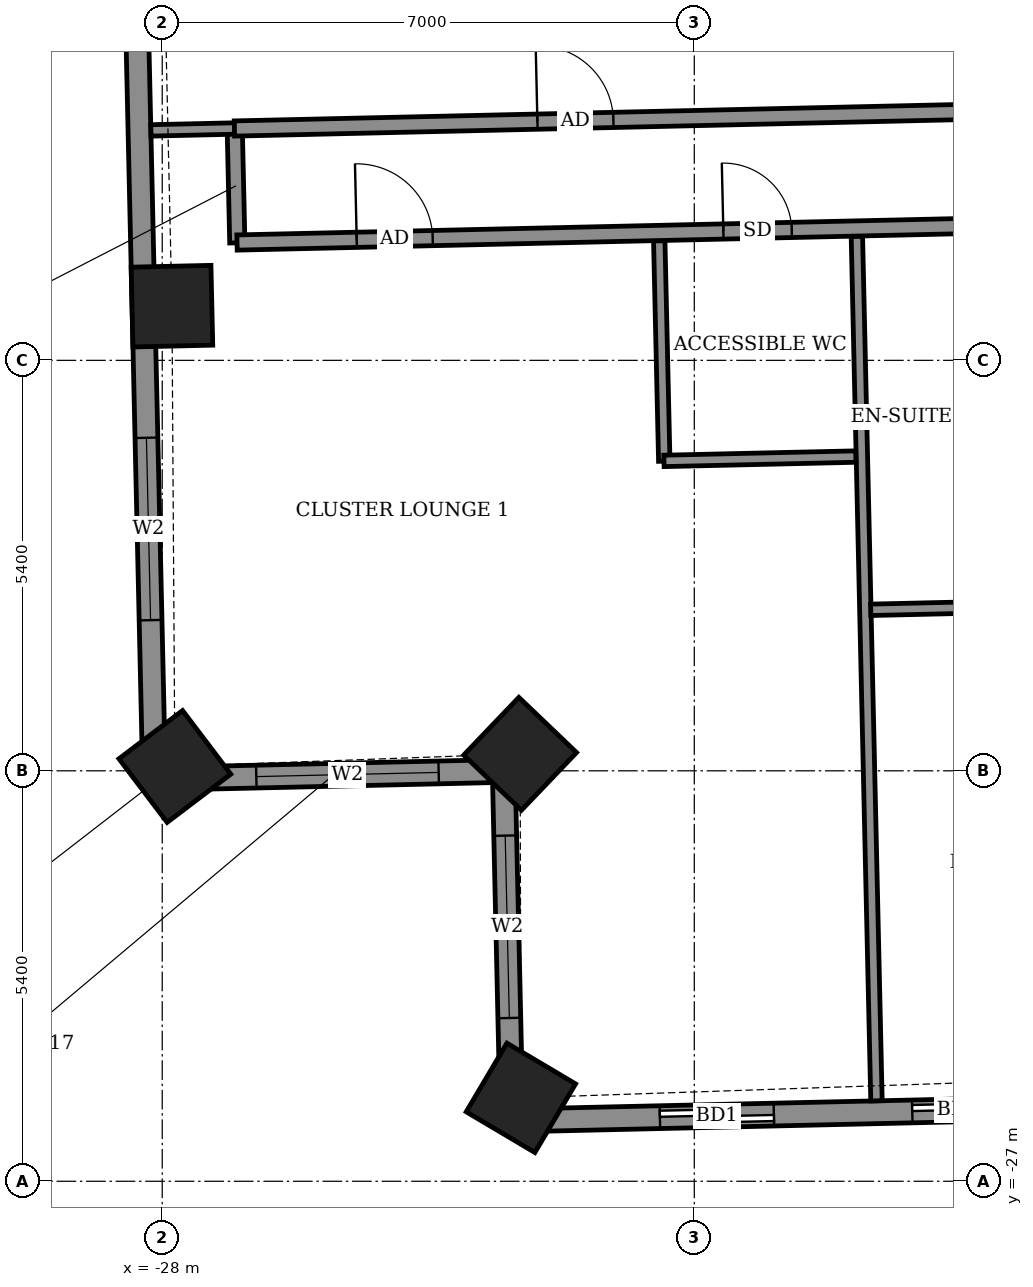
"""IFC4 building model, lengths in metres.
Left out: names, types, materials, properties, quantities, classifications, styles, units other than length and angle.
Written with IfcOpenShell. Run it as: python <this file> out.ifc"""

import sys

from ifc_helpers import new_model, si_unit, direction, frame, frame_2d, origin, origin_2d, place, context, subcontext, project, spatial, rectangle, extrude, element, fill, save


model = new_model("IFC4")
c1 = context("Model", 3, precision=1e-05, world=origin(), true_north=direction((0.0, 1.0)))
c2 = subcontext(c1, "Body", "Model", "MODEL_VIEW")
j1 = project(units=[si_unit("LENGTHUNIT", "METRE"), si_unit("PLANEANGLEUNIT", "RADIAN")], contexts=[c1])
p1 = place(None, origin())
s1 = spatial("IfcSite", under=j1, at=p1, CompositionType="ELEMENT")
p2 = place(p1, origin())
s2 = spatial("IfcBuilding", under=s1, at=p2, CompositionType="ELEMENT")
p3 = place(p2, frame((0.0, 0.0, 249.1)))
s3 = spatial("IfcBuildingStorey", under=s2, at=p3, CompositionType="ELEMENT", Elevation=249.1)
for number, where, z_axis, x_axis in (
    (1, (-27.872, -15.487, -0.55), (0.0, 0.0, 1.0), (0.023, -1.0, 0.0)),
    (2, (-27.833, -21.543, -0.55), (0.0, 0.0, 1.0), (0.604, -0.797, 0.0)),
    (3, (-23.291, -21.376, -0.55), (0.0, 0.0, 1.0), (0.723, -0.691, 0.0)),
    (4, (-23.281, -25.902, -0.55), (0.0, 0.0, 1.0), (0.86, -0.51, 0.0)),
):
    element("IfcColumn", number, at=place(p3, frame(where, z_axis=z_axis, x_axis=x_axis)), inside=s3, PredefinedType="COLUMN", context=c2, shape_type="SweptSolid", body=[
        extrude(rectangle(XDim=1.05, YDim=1.05, at=origin_2d()), origin(), (0.0, 0.0, 1.0), 3.6),
    ])
p4 = place(p3, frame((-28.403, -8.61, 0.0), z_axis=(0.0, 0.0, 1.0), x_axis=(0.022680342038, -0.999742767958, 0.0)))
e5 = element("IfcWall", 5, at=p4, inside=s3, PredefinedType="SOLIDWALL", context=c2, shape_type="SweptSolid", body=[
    extrude(rectangle(XDim=13.1, YDim=0.3, at=frame_2d((6.55, 0.0))), origin(), (0.0, 0.0, 1.0), 2.55),
])
p5 = place(p4, frame((1.937, 0.0, 0.0)))
e6 = element("IfcOpeningElement", 6, at=p5, cuts=e5, PredefinedType="OPENING", context=c2, shape_type="SweptSolid", body=[
    extrude(rectangle(XDim=1.5, YDim=2.4, at=frame_2d((0.75, 1.2))), frame((0.0, 0.16, 0.0), z_axis=(0.0, -1.0, 0.0), x_axis=(1.0, 0.0, 0.0)), (0.0, 0.0, 1.0), 0.32),
])
p6 = place(p4, frame((8.611, 0.0, 0.9)))
e7 = element("IfcOpeningElement", 7, at=p6, cuts=e5, PredefinedType="OPENING", context=c2, shape_type="SweptSolid", body=[
    extrude(rectangle(XDim=2.4, YDim=1.5, at=frame_2d((1.2, 0.75))), frame((0.0, 0.16, 0.0), z_axis=(0.0, -1.0, 0.0), x_axis=(1.0, 0.0, 0.0)), (0.0, 0.0, 1.0), 0.32),
])
p7 = place(p3, frame((-28.106, -21.707, 0.0), z_axis=(0.0, 0.0, 1.0), x_axis=(0.999738756298, 0.022856490471, 0.0)))
e8 = element("IfcWall", 8, at=p7, inside=s3, PredefinedType="SOLIDWALL", context=c2, shape_type="SweptSolid", body=[
    extrude(rectangle(XDim=4.721, YDim=0.3, at=frame_2d((2.361, 0.0))), origin(), (0.0, 0.0, 1.0), 2.55),
])
p8 = place(p7, frame((1.344, 0.0, 0.9)))
e9 = element("IfcOpeningElement", 9, at=p8, cuts=e8, PredefinedType="OPENING", context=c2, shape_type="SweptSolid", body=[
    extrude(rectangle(XDim=2.4, YDim=1.5, at=frame_2d((1.2, 0.75))), frame((0.0, 0.16, 0.0), z_axis=(0.0, -1.0, 0.0), x_axis=(1.0, 0.0, 0.0)), (0.0, 0.0, 1.0), 0.32),
])
p9 = place(p3, frame((-23.507, -21.602, 0.0), z_axis=(0.0, 0.0, 1.0), x_axis=(0.022609285172, -0.999744377441, 0.0)))
e10 = element("IfcWall", 10, at=p9, inside=s3, PredefinedType="SOLIDWALL", context=c2, shape_type="SweptSolid", body=[
    extrude(rectangle(XDim=4.6, YDim=0.3, at=frame_2d((2.3, 0.0))), origin(), (0.0, 0.0, 1.0), 2.55),
])
p10 = place(p9, frame((0.851, 0.0, 0.9)))
e11 = element("IfcOpeningElement", 11, at=p10, cuts=e10, PredefinedType="OPENING", context=c2, shape_type="SweptSolid", body=[
    extrude(rectangle(XDim=2.4, YDim=1.5, at=frame_2d((1.2, 0.75))), frame((0.0, 0.16, 0.0), z_axis=(0.0, -1.0, 0.0), x_axis=(1.0, 0.0, 0.0)), (0.0, 0.0, 1.0), 0.32),
])
p11 = place(p3, frame((-23.403, -26.201, 0.0), z_axis=(0.0, 0.0, 1.0), x_axis=(0.999742770494, 0.022680230258, 0.0)))
e12 = element("IfcWall", 12, at=p11, inside=s3, PredefinedType="SOLIDWALL", context=c2, shape_type="SweptSolid", body=[
    extrude(rectangle(XDim=43.908, YDim=0.3, at=frame_2d((21.954, 0.0))), origin(), (0.0, 0.0, 1.0), 2.55),
])
p12 = place(p11, frame((1.951, 0.0, 0.0)))
e13 = element("IfcOpeningElement", 13, at=p12, cuts=e12, PredefinedType="OPENING", context=c2, shape_type="SweptSolid", body=[
    extrude(rectangle(XDim=1.5, YDim=2.4, at=frame_2d((0.75, 1.2))), frame((0.0, 0.16, 0.0), z_axis=(0.0, -1.0, 0.0), x_axis=(1.0, 0.0, 0.0)), (0.0, 0.0, 1.0), 0.32),
])
p13 = place(p11, frame((5.272, 0.0, 0.0)))
e14 = element("IfcOpeningElement", 14, at=p13, cuts=e12, PredefinedType="OPENING", context=c2, shape_type="SweptSolid", body=[
    extrude(rectangle(XDim=1.2, YDim=2.4, at=frame_2d((0.6, 1.2))), frame((0.0, 0.16, 0.0), z_axis=(0.0, -1.0, 0.0), x_axis=(1.0, 0.0, 0.0)), (0.0, 0.0, 1.0), 0.32),
])
p14 = place(p11, frame((10.475, 0.0, 0.0)))
e15 = element("IfcOpeningElement", 15, at=p14, cuts=e12, PredefinedType="OPENING", context=c2, shape_type="SweptSolid", body=[
    extrude(rectangle(XDim=1.5, YDim=2.4, at=frame_2d((0.75, 1.2))), frame((0.0, 0.16, 0.0), z_axis=(0.0, -1.0, 0.0), x_axis=(1.0, 0.0, 0.0)), (0.0, 0.0, 1.0), 0.32),
])
p15 = place(p11, frame((15.53, 0.0, 0.0)))
e16 = element("IfcOpeningElement", 16, at=p15, cuts=e12, PredefinedType="OPENING", context=c2, shape_type="SweptSolid", body=[
    extrude(rectangle(XDim=1.5, YDim=2.4, at=frame_2d((0.75, 1.2))), frame((0.0, 0.16, 0.0), z_axis=(0.0, -1.0, 0.0), x_axis=(1.0, 0.0, 0.0)), (0.0, 0.0, 1.0), 0.32),
])
p16 = place(p11, frame((18.939, 0.0, 0.0)))
e17 = element("IfcOpeningElement", 17, at=p16, cuts=e12, PredefinedType="OPENING", context=c2, shape_type="SweptSolid", body=[
    extrude(rectangle(XDim=1.5, YDim=2.4, at=frame_2d((0.75, 1.2))), frame((0.0, 0.16, 0.0), z_axis=(0.0, -1.0, 0.0), x_axis=(1.0, 0.0, 0.0)), (0.0, 0.0, 1.0), 0.32),
])
p17 = place(p11, frame((23.489, 0.0, 0.0)))
e18 = element("IfcOpeningElement", 18, at=p17, cuts=e12, PredefinedType="OPENING", context=c2, shape_type="SweptSolid", body=[
    extrude(rectangle(XDim=1.5, YDim=2.4, at=frame_2d((0.75, 1.2))), frame((0.0, 0.16, 0.0), z_axis=(0.0, -1.0, 0.0), x_axis=(1.0, 0.0, 0.0)), (0.0, 0.0, 1.0), 0.32),
])
p18 = place(p11, frame((26.898, 0.0, 0.0)))
e19 = element("IfcOpeningElement", 19, at=p18, cuts=e12, PredefinedType="OPENING", context=c2, shape_type="SweptSolid", body=[
    extrude(rectangle(XDim=1.5, YDim=2.4, at=frame_2d((0.75, 1.2))), frame((0.0, 0.16, 0.0), z_axis=(0.0, -1.0, 0.0), x_axis=(1.0, 0.0, 0.0)), (0.0, 0.0, 1.0), 0.32),
])
p19 = place(p11, frame((32.05, 0.0, 0.0)))
e20 = element("IfcOpeningElement", 20, at=p19, cuts=e12, PredefinedType="OPENING", context=c2, shape_type="SweptSolid", body=[
    extrude(rectangle(XDim=1.5, YDim=2.4, at=frame_2d((0.75, 1.2))), frame((0.0, 0.16, 0.0), z_axis=(0.0, -1.0, 0.0), x_axis=(1.0, 0.0, 0.0)), (0.0, 0.0, 1.0), 0.32),
])
p20 = place(p11, frame((37.382, 0.0, 0.0)))
e21 = element("IfcOpeningElement", 21, at=p20, cuts=e12, PredefinedType="OPENING", context=c2, shape_type="SweptSolid", body=[
    extrude(rectangle(XDim=1.5, YDim=2.4, at=frame_2d((0.75, 1.2))), frame((0.0, 0.16, 0.0), z_axis=(0.0, -1.0, 0.0), x_axis=(1.0, 0.0, 0.0)), (0.0, 0.0, 1.0), 0.32),
])
p21 = place(p11, frame((40.057, 0.0, 0.9)))
e22 = element("IfcOpeningElement", 22, at=p21, cuts=e12, PredefinedType="OPENING", context=c2, shape_type="SweptSolid", body=[
    extrude(rectangle(XDim=2.4, YDim=1.5, at=frame_2d((1.2, 0.75))), frame((0.0, 0.16, 0.0), z_axis=(0.0, -1.0, 0.0), x_axis=(1.0, 0.0, 0.0)), (0.0, 0.0, 1.0), 0.32),
])
p22 = place(p3, frame((-18.603, -25.942, 0.0), z_axis=(0.0, 0.0, 1.0), x_axis=(-0.022684842063, 0.99974266586, 0.0)))
e23 = element("IfcWall", 23, at=p22, inside=s3, PredefinedType="PARTITIONING", context=c2, shape_type="SweptSolid", body=[
    extrude(rectangle(XDim=11.376, YDim=0.15, at=frame_2d((5.688, 0.0))), origin(), (0.0, 0.0, 1.0), 2.55),
])
p23 = place(p3, frame((-18.679, -19.482, 0.0), z_axis=(0.0, 0.0, 1.0), x_axis=(0.999740478815, 0.022781023197, 0.0)))
e24 = element("IfcWall", 24, at=p23, inside=s3, PredefinedType="PARTITIONING", context=c2, shape_type="SweptSolid", body=[
    extrude(rectangle(XDim=2.325, YDim=0.15, at=frame_2d((1.163, 0.0))), origin(), (0.0, 0.0, 1.0), 3.05),
])
p24 = place(p3, frame((-21.395, -17.527, 0.0), z_axis=(0.0, 0.0, 1.0), x_axis=(-0.022730967319, 0.999741618182, 0.0)))
e25 = element("IfcWall", 25, at=p24, inside=s3, PredefinedType="PARTITIONING", context=c2, shape_type="SweptSolid", body=[
    extrude(rectangle(XDim=2.9, YDim=0.15, at=frame_2d((1.45, 0.0))), origin(), (0.0, 0.0, 1.0), 3.05),
])
p25 = place(p3, frame((-21.399, -17.523, 0.0), z_axis=(0.0, 0.0, 1.0), x_axis=(0.9997461113, 0.022532486354, 0.0)))
e26 = element("IfcWall", 26, at=p25, inside=s3, PredefinedType="PARTITIONING", context=c2, shape_type="SweptSolid", body=[
    extrude(rectangle(XDim=2.525, YDim=0.15, at=frame_2d((1.262, 0.0))), origin(), (0.0, 0.0, 1.0), 3.05),
])
p26 = place(p3, frame((-27.012, -14.654, 0.0), z_axis=(0.0, 0.0, 1.0), x_axis=(-0.022617910375, 0.999744182344, 0.0)))
e27 = element("IfcWall", 27, at=p26, inside=s3, PredefinedType="PARTITIONING", context=c2, shape_type="SweptSolid", body=[
    extrude(rectangle(XDim=1.5, YDim=0.2, at=frame_2d((0.75, 0.0))), origin(), (0.0, 0.0, 1.0), 3.05),
])
p27 = place(p3, frame((-27.016, -14.65, 0.0), z_axis=(0.0, 0.0, 1.0), x_axis=(0.999742874861, 0.022675629315, 0.0)))
e28 = element("IfcWall", 28, at=p27, inside=s3, PredefinedType="PARTITIONING", context=c2, shape_type="SweptSolid", body=[
    extrude(rectangle(XDim=50.883, YDim=0.2, at=frame_2d((25.442, 0.0))), origin(), (0.0, 0.0, 1.0), 3.05),
])
p28 = place(p27, frame((1.575, 0.0, 0.0)))
e29 = element("IfcOpeningElement", 29, at=p28, cuts=e28, PredefinedType="OPENING", context=c2, shape_type="SweptSolid", body=[
    extrude(rectangle(XDim=1.0, YDim=2.1, at=frame_2d((0.5, 1.05))), frame((0.0, 0.11, 0.0), z_axis=(0.0, -1.0, 0.0), x_axis=(1.0, 0.0, 0.0)), (0.0, 0.0, 1.0), 0.22),
])
p29 = place(p27, frame((6.4, 0.0, 0.0)))
e30 = element("IfcOpeningElement", 30, at=p29, cuts=e28, PredefinedType="OPENING", context=c2, shape_type="SweptSolid", body=[
    extrude(rectangle(XDim=0.9, YDim=2.1, at=frame_2d((0.45, 1.05))), frame((0.0, 0.11, 0.0), z_axis=(0.0, -1.0, 0.0), x_axis=(1.0, 0.0, 0.0)), (0.0, 0.0, 1.0), 0.22),
])
p30 = place(p27, frame((11.025, 0.0, 0.0)))
e31 = element("IfcOpeningElement", 31, at=p30, cuts=e28, PredefinedType="OPENING", context=c2, shape_type="SweptSolid", body=[
    extrude(rectangle(XDim=0.9, YDim=2.1, at=frame_2d((0.45, 1.05))), frame((0.0, 0.11, 0.0), z_axis=(0.0, -1.0, 0.0), x_axis=(1.0, 0.0, 0.0)), (0.0, 0.0, 1.0), 0.22),
])
p31 = place(p27, frame((12.925, 0.0, 0.0)))
e32 = element("IfcOpeningElement", 32, at=p31, cuts=e28, PredefinedType="OPENING", context=c2, shape_type="SweptSolid", body=[
    extrude(rectangle(XDim=0.9, YDim=2.1, at=frame_2d((0.45, 1.05))), frame((0.0, 0.11, 0.0), z_axis=(0.0, -1.0, 0.0), x_axis=(1.0, 0.0, 0.0)), (0.0, 0.0, 1.0), 0.22),
])
p32 = place(p27, frame((19.65, 0.0, 0.0)))
e33 = element("IfcOpeningElement", 33, at=p32, cuts=e28, PredefinedType="OPENING", context=c2, shape_type="SweptSolid", body=[
    extrude(rectangle(XDim=0.9, YDim=2.1, at=frame_2d((0.45, 1.05))), frame((0.0, 0.11, 0.0), z_axis=(0.0, -1.0, 0.0), x_axis=(1.0, 0.0, 0.0)), (0.0, 0.0, 1.0), 0.22),
])
p33 = place(p27, frame((21.575, 0.0, 0.0)))
e34 = element("IfcOpeningElement", 34, at=p33, cuts=e28, PredefinedType="OPENING", context=c2, shape_type="SweptSolid", body=[
    extrude(rectangle(XDim=0.9, YDim=2.1, at=frame_2d((0.45, 1.05))), frame((0.0, 0.11, 0.0), z_axis=(0.0, -1.0, 0.0), x_axis=(1.0, 0.0, 0.0)), (0.0, 0.0, 1.0), 0.22),
])
p34 = place(p27, frame((28.25, 0.0, 0.0)))
e35 = element("IfcOpeningElement", 35, at=p34, cuts=e28, PredefinedType="OPENING", context=c2, shape_type="SweptSolid", body=[
    extrude(rectangle(XDim=0.9, YDim=2.1, at=frame_2d((0.45, 1.05))), frame((0.0, 0.11, 0.0), z_axis=(0.0, -1.0, 0.0), x_axis=(1.0, 0.0, 0.0)), (0.0, 0.0, 1.0), 0.22),
])
p35 = place(p27, frame((30.125, 0.0, 0.0)))
e36 = element("IfcOpeningElement", 36, at=p35, cuts=e28, PredefinedType="OPENING", context=c2, shape_type="SweptSolid", body=[
    extrude(rectangle(XDim=0.9, YDim=2.1, at=frame_2d((0.45, 1.05))), frame((0.0, 0.11, 0.0), z_axis=(0.0, -1.0, 0.0), x_axis=(1.0, 0.0, 0.0)), (0.0, 0.0, 1.0), 0.22),
])
p36 = place(p27, frame((36.9, 0.0, 0.0)))
e37 = element("IfcOpeningElement", 37, at=p36, cuts=e28, PredefinedType="OPENING", context=c2, shape_type="SweptSolid", body=[
    extrude(rectangle(XDim=0.9, YDim=2.1, at=frame_2d((0.45, 1.05))), frame((0.0, 0.11, 0.0), z_axis=(0.0, -1.0, 0.0), x_axis=(1.0, 0.0, 0.0)), (0.0, 0.0, 1.0), 0.22),
])
p37 = place(p27, frame((38.85, 0.0, 0.0)))
e38 = element("IfcOpeningElement", 38, at=p37, cuts=e28, PredefinedType="OPENING", context=c2, shape_type="SweptSolid", body=[
    extrude(rectangle(XDim=0.9, YDim=2.1, at=frame_2d((0.45, 1.05))), frame((0.0, 0.11, 0.0), z_axis=(0.0, -1.0, 0.0), x_axis=(1.0, 0.0, 0.0)), (0.0, 0.0, 1.0), 0.22),
])
p38 = place(p27, frame((48.629, 0.0, 0.0)))
e39 = element("IfcOpeningElement", 39, at=p38, cuts=e28, PredefinedType="OPENING", context=c2, shape_type="SweptSolid", body=[
    extrude(rectangle(XDim=1.0, YDim=2.1, at=frame_2d((0.5, 1.05))), frame((0.0, 0.11, 0.0), z_axis=(0.0, -1.0, 0.0), x_axis=(1.0, 0.0, 0.0)), (0.0, 0.0, 1.0), 0.22),
])
p39 = place(p27, frame((43.6, 0.0, 0.0)))
e40 = element("IfcOpeningElement", 40, at=p39, cuts=e28, PredefinedType="OPENING", context=c2, shape_type="SweptSolid", body=[
    extrude(rectangle(XDim=0.9, YDim=2.1, at=frame_2d((0.45, 1.05))), frame((0.0, 0.11, 0.0), z_axis=(0.0, -1.0, 0.0), x_axis=(1.0, 0.0, 0.0)), (0.0, 0.0, 1.0), 0.22),
])
p40 = place(p3, frame((-28.149, -13.175, 0.0), z_axis=(0.0, 0.0, 1.0), x_axis=(0.999740233734, 0.022791776024, 0.0)))
e41 = element("IfcWall", 41, at=p40, inside=s3, PredefinedType="PARTITIONING", context=c2, shape_type="SweptSolid", body=[
    extrude(rectangle(XDim=1.103, YDim=0.15, at=frame_2d((0.552, 0.0))), origin(), (0.0, 0.0, 1.0), 2.55),
])
p41 = place(p3, frame((-27.05, -13.15, 0.0), z_axis=(0.0, 0.0, 1.0), x_axis=(0.999743679035, 0.022640146404, 0.0)))
e42 = element("IfcWall", 42, at=p41, inside=s3, PredefinedType="PARTITIONING", context=c2, shape_type="SweptSolid", body=[
    extrude(rectangle(XDim=10.374, YDim=0.2, at=frame_2d((5.187, 0.0))), origin(), (0.0, 0.0, 1.0), 3.05),
])
p42 = place(p41, frame((3.987, 0.0, 0.0)))
e43 = element("IfcOpeningElement", 43, at=p42, cuts=e42, PredefinedType="OPENING", context=c2, shape_type="SweptSolid", body=[
    extrude(rectangle(XDim=1.0, YDim=2.1, at=frame_2d((0.5, 1.05))), frame((0.0, 0.11, 0.0), z_axis=(0.0, -1.0, 0.0), x_axis=(1.0, 0.0, 0.0)), (0.0, 0.0, 1.0), 0.22),
])
p43 = place(p6, origin())
e44 = element("IfcWindow", 44, at=p43, inside=s3, PartitioningType="DOUBLE_PANEL_VERTICAL", PredefinedType="WINDOW", context=c2, shape_type="SweptSolid", body=[
    extrude(rectangle(XDim=2.4, YDim=1.5, at=frame_2d((1.2, 0.75))), frame((0.0, 0.03, 0.0), z_axis=(0.0, -1.0, 0.0), x_axis=(1.0, 0.0, 0.0)), (0.0, 0.0, 1.0), 0.06),
])
fill(e7, e44)
p44 = place(p8, origin())
e45 = element("IfcWindow", 45, at=p44, inside=s3, PartitioningType="DOUBLE_PANEL_VERTICAL", PredefinedType="WINDOW", context=c2, shape_type="SweptSolid", body=[
    extrude(rectangle(XDim=2.4, YDim=1.5, at=frame_2d((1.2, 0.75))), frame((0.0, 0.03, 0.0), z_axis=(0.0, -1.0, 0.0), x_axis=(1.0, 0.0, 0.0)), (0.0, 0.0, 1.0), 0.06),
])
fill(e9, e45)
p45 = place(p10, origin())
e46 = element("IfcWindow", 46, at=p45, inside=s3, PartitioningType="DOUBLE_PANEL_VERTICAL", PredefinedType="WINDOW", context=c2, shape_type="SweptSolid", body=[
    extrude(rectangle(XDim=2.4, YDim=1.5, at=frame_2d((1.2, 0.75))), frame((0.0, 0.03, 0.0), z_axis=(0.0, -1.0, 0.0), x_axis=(1.0, 0.0, 0.0)), (0.0, 0.0, 1.0), 0.06),
])
fill(e11, e46)
p46 = place(p12, origin())
e47 = element("IfcDoor", 47, at=p46, inside=s3, OperationType="SLIDING_TO_LEFT", PredefinedType="DOOR", context=c2, shape_type="SweptSolid", body=[
    extrude(rectangle(XDim=1.5, YDim=2.4, at=frame_2d((0.75, 1.2))), frame((0.0, 0.025, 0.0), z_axis=(0.0, -1.0, 0.0), x_axis=(1.0, 0.0, 0.0)), (0.0, 0.0, 1.0), 0.05),
])
fill(e13, e47)
p47 = place(p13, origin())
e48 = element("IfcDoor", 48, at=p47, inside=s3, OperationType="SLIDING_TO_LEFT", PredefinedType="DOOR", context=c2, shape_type="SweptSolid", body=[
    extrude(rectangle(XDim=1.2, YDim=2.4, at=frame_2d((0.6, 1.2))), frame((0.0, 0.025, 0.0), z_axis=(0.0, -1.0, 0.0), x_axis=(1.0, 0.0, 0.0)), (0.0, 0.0, 1.0), 0.05),
])
fill(e14, e48)
p48 = place(p28, origin())
e49 = element("IfcDoor", 49, at=p48, inside=s3, OperationType="SINGLE_SWING_LEFT", PredefinedType="DOOR", context=c2, shape_type="SweptSolid", body=[
    extrude(rectangle(XDim=1.0, YDim=2.1, at=frame_2d((0.5, 1.05))), frame((0.0, 0.025, 0.0), z_axis=(0.0, -1.0, 0.0), x_axis=(1.0, 0.0, 0.0)), (0.0, 0.0, 1.0), 0.05),
])
fill(e29, e49)
p49 = place(p29, origin())
e50 = element("IfcDoor", 50, at=p49, inside=s3, OperationType="SINGLE_SWING_LEFT", PredefinedType="DOOR", context=c2, shape_type="SweptSolid", body=[
    extrude(rectangle(XDim=0.9, YDim=2.1, at=frame_2d((0.45, 1.05))), frame((0.0, 0.025, 0.0), z_axis=(0.0, -1.0, 0.0), x_axis=(1.0, 0.0, 0.0)), (0.0, 0.0, 1.0), 0.05),
])
fill(e30, e50)
p50 = place(p42, origin())
e51 = element("IfcDoor", 51, at=p50, inside=s3, OperationType="SINGLE_SWING_LEFT", PredefinedType="DOOR", context=c2, shape_type="SweptSolid", body=[
    extrude(rectangle(XDim=1.0, YDim=2.1, at=frame_2d((0.5, 1.05))), frame((0.0, 0.025, 0.0), z_axis=(0.0, -1.0, 0.0), x_axis=(1.0, 0.0, 0.0)), (0.0, 0.0, 1.0), 0.05),
])
fill(e43, e51)
save(model, sys.argv[1])
